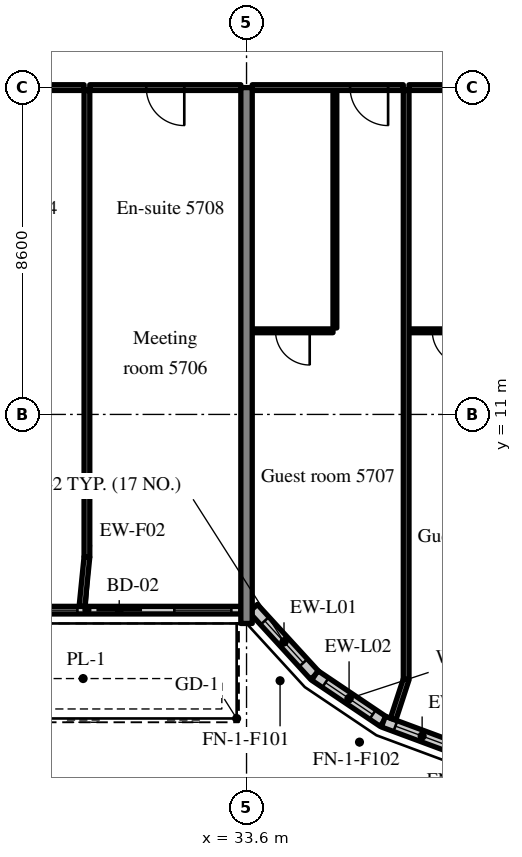
"""IFC4 building model, lengths in metres.
Left out: names, types, materials, properties, quantities, classifications, styles, units other than length and angle.
Written with IfcOpenShell. Run it as: python <this file> out.ifc"""

import sys

from ifc_helpers import new_model, si_unit, direction, frame, frame_2d, origin, place, context, subcontext, project, spatial, rectangle, extrude, source, transform, mapped, element, fill, save


model = new_model("IFC4")
c1 = context("Model", 3, precision=1e-05, world=origin(), true_north=direction((0.0, 1.0)))
c2 = subcontext(c1, "Body", "Model", "MODEL_VIEW")
j1 = project(units=[si_unit("LENGTHUNIT", "METRE"), si_unit("PLANEANGLEUNIT", "RADIAN")], contexts=[c1])
p1 = place(None, origin())
s1 = spatial("IfcSite", under=j1, at=p1, CompositionType="ELEMENT")
p2 = place(p1, origin())
s2 = spatial("IfcBuilding", under=s1, at=p2, CompositionType="ELEMENT")
p3 = place(p2, frame((0.0, 0.0, 237.4)))
s3 = spatial("IfcBuildingStorey", under=s2, at=p3, CompositionType="ELEMENT", Elevation=237.4)
m1 = source(origin(), c2, "Body", "SweptSolid", [
    extrude(rectangle(XDim=14.1, YDim=0.3, at=frame_2d((7.05, 0.0))), origin(), (0.0, 0.0, 1.0), 3.62),
])
p4 = place(p3, frame((33.6, 5.5, 0.0), z_axis=(0.0, 0.0, 1.0), x_axis=(0.0, 1.0, 0.0)))
e1 = element("IfcWall", 1, at=p4, inside=s3, PredefinedType="SHEAR", context=c2, shape_type="MappedRepresentation", body=[
    mapped(m1, transform((0.0, 0.0, 0.0), scale=1.0)),
])
m2 = source(origin(), c2, "Body", "SweptSolid", [
    extrude(rectangle(XDim=8.1, YDim=0.2, at=frame_2d((4.05, 0.0))), origin(), (0.0, 0.0, 1.0), 3.02),
])
p5 = place(p3, frame((25.35, 5.85, 0.0), z_axis=(0.0, 0.0, 1.0), x_axis=(1.0, 0.0, 0.0)))
e2 = element("IfcWall", 2, at=p5, inside=s3, PredefinedType="SOLIDWALL", context=c2, shape_type="MappedRepresentation", body=[
    mapped(m2, transform((0.0, 0.0, 0.0), scale=1.0)),
])
m3 = source(origin(), c2, "Body", "SweptSolid", [
    extrude(rectangle(XDim=1.2, YDim=2.4, at=frame_2d((0.6, 1.2))), frame((0.0, 0.11, 0.0), z_axis=(0.0, -1.0, 0.0), x_axis=(1.0, 0.0, 0.0)), (0.0, 0.0, 1.0), 0.22),
])
p6 = place(p5, frame((0.25, 0.0, 0.0)))
e3 = element("IfcOpeningElement", 3, at=p6, cuts=e2, PredefinedType="OPENING", context=c2, shape_type="MappedRepresentation", body=[
    mapped(m3, transform((0.0, 0.0, 0.0), scale=1.0)),
])
m4 = source(origin(), c2, "Body", "SweptSolid", [
    extrude(rectangle(XDim=1.5, YDim=1.5, at=frame_2d((0.75, 0.75))), frame((0.0, 0.11, 0.0), z_axis=(0.0, -1.0, 0.0), x_axis=(1.0, 0.0, 0.0)), (0.0, 0.0, 1.0), 0.22),
])
p7 = place(p5, frame((2.3, 0.0, 0.9)))
e4 = element("IfcOpeningElement", 4, at=p7, cuts=e2, PredefinedType="OPENING", context=c2, shape_type="MappedRepresentation", body=[
    mapped(m4, transform((0.0, 0.0, 0.0), scale=1.0)),
])
p8 = place(p5, frame((4.3, 0.0, 0.0)))
e5 = element("IfcOpeningElement", 5, at=p8, cuts=e2, PredefinedType="OPENING", context=c2, shape_type="MappedRepresentation", body=[
    mapped(m3, transform((0.0, 0.0, 0.0), scale=1.0)),
])
p9 = place(p5, frame((6.35, 0.0, 0.9)))
e6 = element("IfcOpeningElement", 6, at=p9, cuts=e2, PredefinedType="OPENING", context=c2, shape_type="MappedRepresentation", body=[
    mapped(m4, transform((0.0, 0.0, 0.0), scale=1.0)),
])
m5 = source(origin(), c2, "Body", "SweptSolid", [
    extrude(rectangle(XDim=2.398, YDim=0.3, at=frame_2d((1.199, 0.0))), origin(), (0.0, 0.0, 1.0), 3.62),
])
p10 = place(p3, frame((33.776, 5.9, 0.0), z_axis=(0.0, 0.0, 1.0), x_axis=(0.675374189419, -0.737475222815, 0.0)))
e7 = element("IfcWall", 7, at=p10, inside=s3, PredefinedType="SOLIDWALL", context=c2, shape_type="MappedRepresentation", body=[
    mapped(m5, transform((0.0, 0.0, 0.0), scale=1.0)),
])
m6 = source(origin(), c2, "Body", "SweptSolid", [
    extrude(rectangle(XDim=1.5, YDim=2.0, at=frame_2d((0.75, 1.0))), frame((0.0, 0.16, 0.0), z_axis=(0.0, -1.0, 0.0), x_axis=(1.0, 0.0, 0.0)), (0.0, 0.0, 1.0), 0.32),
])
p11 = place(p10, frame((0.449, 0.0, 0.9)))
e8 = element("IfcOpeningElement", 8, at=p11, cuts=e7, PredefinedType="OPENING", context=c2, shape_type="MappedRepresentation", body=[
    mapped(m6, transform((0.0, 0.0, 0.0), scale=1.0)),
])
m7 = source(origin(), c2, "Body", "SweptSolid", [
    extrude(rectangle(XDim=2.176, YDim=0.3, at=frame_2d((1.088, 0.0))), origin(), (0.0, 0.0, 1.0), 3.62),
])
p12 = place(p3, frame((35.396, 4.131, 0.0), z_axis=(0.0, 0.0, 1.0), x_axis=(0.829590746428, -0.558371913192, 0.0)))
e9 = element("IfcWall", 9, at=p12, inside=s3, PredefinedType="SOLIDWALL", context=c2, shape_type="MappedRepresentation", body=[
    mapped(m7, transform((0.0, 0.0, 0.0), scale=1.0)),
])
p13 = place(p12, frame((0.338, 0.0, 0.9)))
e10 = element("IfcOpeningElement", 10, at=p13, cuts=e9, PredefinedType="OPENING", context=c2, shape_type="MappedRepresentation", body=[
    mapped(m6, transform((0.0, 0.0, 0.0), scale=1.0)),
])
p14 = place(p3, frame((37.201, 2.917, 0.0), z_axis=(0.0, 0.0, 1.0), x_axis=(0.93754555999, -0.347862505801, 0.0)))
e11 = element("IfcWall", 11, at=p14, inside=s3, PredefinedType="SOLIDWALL", context=c2, shape_type="MappedRepresentation", body=[
    mapped(m7, transform((0.0, 0.0, 0.0), scale=1.0)),
])
p15 = place(p14, frame((0.338, 0.0, 0.9)))
e12 = element("IfcOpeningElement", 12, at=p15, cuts=e11, PredefinedType="OPENING", context=c2, shape_type="MappedRepresentation", body=[
    mapped(m6, transform((0.0, 0.0, 0.0), scale=1.0)),
])
m8 = source(origin(), c2, "Body", "SweptSolid", [
    extrude(rectangle(XDim=3.975, YDim=0.15, at=frame_2d((1.987, 0.0))), origin(), (0.0, 0.0, 1.0), 2.92),
])
p16 = place(p3, frame((25.35, 19.6, 0.0), z_axis=(0.0, 0.0, 1.0), x_axis=(1.0, 0.0, 0.0)))
e13 = element("IfcWall", 13, at=p16, inside=s3, PredefinedType="PARTITIONING", context=c2, shape_type="MappedRepresentation", body=[
    mapped(m8, transform((0.0, 0.0, 0.0), scale=1.0)),
])
m9 = source(origin(), c2, "Body", "SweptSolid", [
    extrude(rectangle(XDim=1.0, YDim=2.1, at=frame_2d((0.5, 1.05))), frame((0.0, 0.085, 0.0), z_axis=(0.0, -1.0, 0.0), x_axis=(1.0, 0.0, 0.0)), (0.0, 0.0, 1.0), 0.17),
])
p17 = place(p16, frame((1.487, 0.0, 0.0)))
e14 = element("IfcOpeningElement", 14, at=p17, cuts=e13, PredefinedType="OPENING", context=c2, shape_type="MappedRepresentation", body=[
    mapped(m9, transform((0.0, 0.0, 0.0), scale=1.0)),
])
p18 = place(p3, frame((29.475, 19.6, 0.0), z_axis=(0.0, 0.0, 1.0), x_axis=(1.0, 0.0, 0.0)))
e15 = element("IfcWall", 15, at=p18, inside=s3, PredefinedType="PARTITIONING", context=c2, shape_type="MappedRepresentation", body=[
    mapped(m8, transform((0.0, 0.0, 0.0), scale=1.0)),
])
p19 = place(p18, frame((1.487, 0.0, 0.0)))
e16 = element("IfcOpeningElement", 16, at=p19, cuts=e15, PredefinedType="OPENING", context=c2, shape_type="MappedRepresentation", body=[
    mapped(m9, transform((0.0, 0.0, 0.0), scale=1.0)),
])
m10 = source(origin(), c2, "Body", "SweptSolid", [
    extrude(rectangle(XDim=12.275, YDim=0.15, at=frame_2d((6.137, 0.0))), origin(), (0.0, 0.0, 1.0), 3.62),
])
p20 = place(p3, frame((29.4, 7.25, 0.0), z_axis=(0.0, 0.0, 1.0), x_axis=(0.0, 1.0, 0.0)))
e17 = element("IfcWall", 17, at=p20, inside=s3, PredefinedType="PARTITIONING", context=c2, shape_type="MappedRepresentation", body=[
    mapped(m10, transform((0.0, 0.0, 0.0), scale=1.0)),
])
m11 = source(origin(), c2, "Body", "SweptSolid", [
    extrude(rectangle(XDim=6.25, YDim=0.1, at=frame_2d((3.125, 0.0))), origin(), (0.0, 0.0, 1.0), 3.62),
])
p21 = place(p3, frame((35.925, 13.275, 0.0), z_axis=(0.0, 0.0, 1.0), x_axis=(0.0, 1.0, 0.0)))
e18 = element("IfcWall", 18, at=p21, inside=s3, PredefinedType="PARTITIONING", context=c2, shape_type="MappedRepresentation", body=[
    mapped(m11, transform((0.0, 0.0, 0.0), scale=1.0)),
])
m12 = source(origin(), c2, "Body", "SweptSolid", [
    extrude(rectangle(XDim=2.125, YDim=0.1, at=frame_2d((1.062, 0.0))), origin(), (0.0, 0.0, 1.0), 3.62),
])
p22 = place(p3, frame((33.75, 13.2, 0.0), z_axis=(0.0, 0.0, 1.0), x_axis=(1.0, 0.0, 0.0)))
e19 = element("IfcWall", 19, at=p22, inside=s3, PredefinedType="PARTITIONING", context=c2, shape_type="MappedRepresentation", body=[
    mapped(m12, transform((0.0, 0.0, 0.0), scale=1.0)),
])
m13 = source(origin(), c2, "Body", "SweptSolid", [
    extrude(rectangle(XDim=0.9, YDim=2.1, at=frame_2d((0.45, 1.05))), frame((0.0, 0.06, 0.0), z_axis=(0.0, -1.0, 0.0), x_axis=(1.0, 0.0, 0.0)), (0.0, 0.0, 1.0), 0.12),
])
p23 = place(p22, frame((0.612, 0.0, 0.0)))
e20 = element("IfcOpeningElement", 20, at=p23, cuts=e19, PredefinedType="OPENING", context=c2, shape_type="MappedRepresentation", body=[
    mapped(m13, transform((0.0, 0.0, 0.0), scale=1.0)),
])
m14 = source(origin(), c2, "Body", "SweptSolid", [
    extrude(rectangle(XDim=3.975, YDim=0.15, at=frame_2d((1.988, 0.0))), origin(), (0.0, 0.0, 1.0), 2.92),
])
p24 = place(p3, frame((33.75, 19.6, 0.0), z_axis=(0.0, 0.0, 1.0), x_axis=(1.0, 0.0, 0.0)))
e21 = element("IfcWall", 21, at=p24, inside=s3, PredefinedType="PARTITIONING", context=c2, shape_type="MappedRepresentation", body=[
    mapped(m14, transform((0.0, 0.0, 0.0), scale=1.0)),
])
p25 = place(p24, frame((2.575, 0.0, 0.0)))
e22 = element("IfcOpeningElement", 22, at=p25, cuts=e21, PredefinedType="OPENING", context=c2, shape_type="MappedRepresentation", body=[
    mapped(m9, transform((0.0, 0.0, 0.0), scale=1.0)),
])
p26 = place(p3, frame((37.875, 13.2, 0.0), z_axis=(0.0, 0.0, 1.0), x_axis=(1.0, 0.0, 0.0)))
e23 = element("IfcWall", 23, at=p26, inside=s3, PredefinedType="PARTITIONING", context=c2, shape_type="MappedRepresentation", body=[
    mapped(m12, transform((0.0, 0.0, 0.0), scale=1.0)),
])
p27 = place(p26, frame((0.612, 0.0, 0.0)))
e24 = element("IfcOpeningElement", 24, at=p27, cuts=e23, PredefinedType="OPENING", context=c2, shape_type="MappedRepresentation", body=[
    mapped(m13, transform((0.0, 0.0, 0.0), scale=1.0)),
])
p28 = place(p3, frame((37.875, 19.6, 0.0), z_axis=(0.0, 0.0, 1.0), x_axis=(1.0, 0.0, 0.0)))
e25 = element("IfcWall", 25, at=p28, inside=s3, PredefinedType="PARTITIONING", context=c2, shape_type="MappedRepresentation", body=[
    mapped(m14, transform((0.0, 0.0, 0.0), scale=1.0)),
])
p29 = place(p28, frame((2.575, 0.0, 0.0)))
e26 = element("IfcOpeningElement", 26, at=p29, cuts=e25, PredefinedType="OPENING", context=c2, shape_type="MappedRepresentation", body=[
    mapped(m9, transform((0.0, 0.0, 0.0), scale=1.0)),
])
m15 = source(origin(), c2, "Body", "SweptSolid", [
    extrude(rectangle(XDim=15.498, YDim=0.15, at=frame_2d((7.749, 0.0))), origin(), (0.0, 0.0, 1.0), 3.62),
])
p30 = place(p3, frame((37.8, 4.027, 0.0), z_axis=(0.0, 0.0, 1.0), x_axis=(0.0, 1.0, 0.0)))
e27 = element("IfcWall", 27, at=p30, inside=s3, PredefinedType="PARTITIONING", context=c2, shape_type="MappedRepresentation", body=[
    mapped(m15, transform((0.0, 0.0, 0.0), scale=1.0)),
])
m16 = source(origin(), c2, "Body", "SweptSolid", [
    extrude(rectangle(XDim=1.307, YDim=0.15, at=frame_2d((0.653, 0.0))), origin(), (0.0, 0.0, 1.0), 3.62),
])
p31 = place(p3, frame((29.27, 5.95, 0.0), z_axis=(0.0, 0.0, 1.0), x_axis=(0.099411212066, 0.995046436562, 0.0)))
e28 = element("IfcWall", 28, at=p31, inside=s3, PredefinedType="PARTITIONING", context=c2, shape_type="MappedRepresentation", body=[
    mapped(m16, transform((0.0, 0.0, 0.0), scale=1.0)),
])
m17 = source(origin(), c2, "Body", "SweptSolid", [
    extrude(rectangle(XDim=1.101, YDim=0.15, at=frame_2d((0.55, 0.0))), origin(), (0.0, 0.0, 1.0), 3.62),
])
p32 = place(p3, frame((37.457, 2.981, 0.0), z_axis=(0.0, 0.0, 1.0), x_axis=(0.311567081539, 0.950224159712, 0.0)))
e29 = element("IfcWall", 29, at=p32, inside=s3, PredefinedType="PARTITIONING", context=c2, shape_type="MappedRepresentation", body=[
    mapped(m17, transform((0.0, 0.0, 0.0), scale=1.0)),
])
m18 = source(origin(), c2, "Body", "SweptSolid", [
    extrude(rectangle(XDim=1.5, YDim=1.5, at=frame_2d((0.75, 0.75))), frame((0.0, 0.03, 0.0), z_axis=(0.0, -1.0, 0.0), x_axis=(1.0, 0.0, 0.0)), (0.0, 0.0, 1.0), 0.06),
])
p33 = place(p7, origin())
e30 = element("IfcWindow", 30, at=p33, inside=s3, PartitioningType="SINGLE_PANEL", PredefinedType="WINDOW", context=c2, shape_type="MappedRepresentation", body=[
    mapped(m18, transform((0.0, 0.0, 0.0), scale=1.0)),
])
fill(e4, e30)
m19 = source(origin(), c2, "Body", "SweptSolid", [
    extrude(rectangle(XDim=1.2, YDim=2.4, at=frame_2d((0.6, 1.2))), frame((0.0, 0.025, 0.0), z_axis=(0.0, -1.0, 0.0), x_axis=(1.0, 0.0, 0.0)), (0.0, 0.0, 1.0), 0.05),
])
p34 = place(p8, origin())
e31 = element("IfcDoor", 31, at=p34, inside=s3, OperationType="SLIDING_TO_RIGHT", PredefinedType="DOOR", context=c2, shape_type="MappedRepresentation", body=[
    mapped(m19, transform((0.0, 0.0, 0.0), scale=1.0)),
])
fill(e5, e31)
p35 = place(p9, origin())
e32 = element("IfcWindow", 32, at=p35, inside=s3, PartitioningType="SINGLE_PANEL", PredefinedType="WINDOW", context=c2, shape_type="MappedRepresentation", body=[
    mapped(m18, transform((0.0, 0.0, 0.0), scale=1.0)),
])
fill(e6, e32)
m20 = source(origin(), c2, "Body", "SweptSolid", [
    extrude(rectangle(XDim=1.5, YDim=2.0, at=frame_2d((0.75, 1.0))), frame((0.0, 0.03, 0.0), z_axis=(0.0, -1.0, 0.0), x_axis=(1.0, 0.0, 0.0)), (0.0, 0.0, 1.0), 0.06),
])
p36 = place(p11, origin())
e33 = element("IfcWindow", 33, at=p36, inside=s3, PartitioningType="SINGLE_PANEL", PredefinedType="WINDOW", context=c2, shape_type="MappedRepresentation", body=[
    mapped(m20, transform((0.0, 0.0, 0.0), scale=1.0)),
])
fill(e8, e33)
p37 = place(p13, origin())
e34 = element("IfcWindow", 34, at=p37, inside=s3, PartitioningType="SINGLE_PANEL", PredefinedType="WINDOW", context=c2, shape_type="MappedRepresentation", body=[
    mapped(m20, transform((0.0, 0.0, 0.0), scale=1.0)),
])
fill(e10, e34)
p38 = place(p15, origin())
e35 = element("IfcWindow", 35, at=p38, inside=s3, PartitioningType="SINGLE_PANEL", PredefinedType="WINDOW", context=c2, shape_type="MappedRepresentation", body=[
    mapped(m20, transform((0.0, 0.0, 0.0), scale=1.0)),
])
fill(e12, e35)
m21 = source(origin(), c2, "Body", "SweptSolid", [
    extrude(rectangle(XDim=1.0, YDim=2.1, at=frame_2d((0.5, 1.05))), frame((0.0, 0.025, 0.0), z_axis=(0.0, -1.0, 0.0), x_axis=(1.0, 0.0, 0.0)), (0.0, 0.0, 1.0), 0.05),
])
p39 = place(p19, origin())
e36 = element("IfcDoor", 36, at=p39, inside=s3, OperationType="SINGLE_SWING_RIGHT", PredefinedType="DOOR", context=c2, shape_type="MappedRepresentation", body=[
    mapped(m21, transform((0.0, 0.0, 0.0), scale=1.0)),
])
fill(e16, e36)
m22 = source(origin(), c2, "Body", "SweptSolid", [
    extrude(rectangle(XDim=0.9, YDim=2.1, at=frame_2d((0.45, 1.05))), frame((0.0, 0.025, 0.0), z_axis=(0.0, -1.0, 0.0), x_axis=(1.0, 0.0, 0.0)), (0.0, 0.0, 1.0), 0.05),
])
p40 = place(p23, origin())
e37 = element("IfcDoor", 37, at=p40, inside=s3, OperationType="SINGLE_SWING_RIGHT", PredefinedType="DOOR", context=c2, shape_type="MappedRepresentation", body=[
    mapped(m22, transform((0.0, 0.0, 0.0), scale=1.0)),
])
fill(e20, e37)
p41 = place(p25, origin())
e38 = element("IfcDoor", 38, at=p41, inside=s3, OperationType="SINGLE_SWING_RIGHT", PredefinedType="DOOR", context=c2, shape_type="MappedRepresentation", body=[
    mapped(m21, transform((0.0, 0.0, 0.0), scale=1.0)),
])
fill(e22, e38)
p42 = place(p27, origin())
e39 = element("IfcDoor", 39, at=p42, inside=s3, OperationType="SINGLE_SWING_RIGHT", PredefinedType="DOOR", context=c2, shape_type="MappedRepresentation", body=[
    mapped(m22, transform((0.0, 0.0, 0.0), scale=1.0)),
])
fill(e24, e39)
save(model, sys.argv[1])
